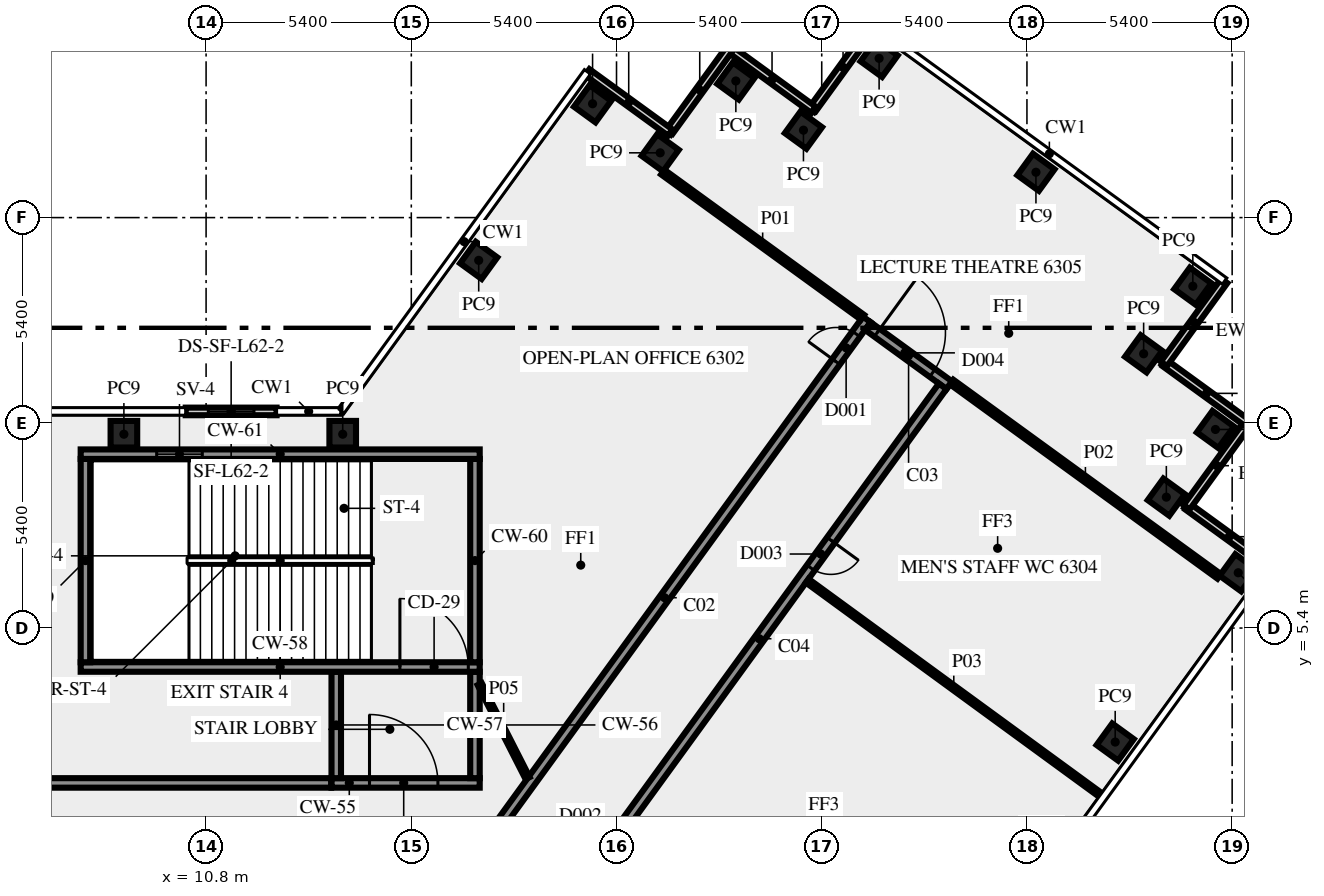
"""IFC4 building model, lengths in metres.
Left out: names, types, materials, properties, quantities, classifications, styles, units other than length and angle.
Written with IfcOpenShell. Run it as: python <this file> out.ifc"""

import sys

from ifc_helpers import new_model, si_unit, direction, frame, frame_2d, origin, origin_2d, place, context, subcontext, project, spatial, rectangle, extrude, element, fill, save


model = new_model("IFC4")
c1 = context("Model", 3, precision=1e-05, world=origin(), true_north=direction((0.0, 1.0)))
c2 = subcontext(c1, "Body", "Model", "MODEL_VIEW")
j1 = project(units=[si_unit("LENGTHUNIT", "METRE"), si_unit("PLANEANGLEUNIT", "RADIAN")], contexts=[c1])
p1 = place(None, origin())
s1 = spatial("IfcSite", under=j1, at=p1, CompositionType="ELEMENT")
p2 = place(p1, origin())
s2 = spatial("IfcBuilding", under=s1, at=p2, CompositionType="ELEMENT")
p3 = place(p2, frame((0.0, 0.0, 269.0)))
s3 = spatial("IfcBuildingStorey", under=s2, at=p3, CompositionType="ELEMENT", Elevation=269.0)
for number, where, z_axis, x_axis in (
    (1, (34.722, 2.4, 0.0), (0.0, 0.0, 1.0), (0.588, 0.809, 0.0)),
    (2, (37.96, 6.855, 0.0), (0.0, 0.0, 1.0), (0.588, 0.809, 0.0)),
    (3, (36.068, 8.844, 0.0), (0.0, 0.0, 1.0), (0.588, 0.809, 0.0)),
    (4, (37.36, 10.625, 0.0), (0.0, 0.0, 1.0), (0.588, 0.809, 0.0)),
    (5, (35.471, 12.616, 0.0), (0.0, 0.0, 1.0), (-0.809, 0.588, 0.0)),
    (6, (36.765, 14.395, 0.0), (0.0, 0.0, 1.0), (-0.809, 0.588, 0.0)),
    (7, (32.637, 17.393, 0.0), (0.0, 0.0, 1.0), (-0.809, 0.588, 0.0)),
    (8, (28.51, 20.39, 0.0), (0.0, 0.0, 1.0), (-0.588, -0.809, 0.0)),
    (9, (26.519, 18.5, 0.0), (0.0, 0.0, 1.0), (-0.809, 0.588, 0.0)),
    (10, (24.74, 19.795, 0.0), (0.0, 0.0, 1.0), (-0.588, -0.809, 0.0)),
    (11, (22.749, 17.904, 0.0), (0.0, 0.0, 1.0), (-0.588, -0.809, 0.0)),
    (12, (20.97, 19.195, 0.0), (0.0, 0.0, 1.0), (-0.588, -0.809, 0.0)),
    (13, (17.974, 15.075, 0.0), (0.0, 0.0, 1.0), (-0.588, -0.809, 0.0)),
    (14, (14.395, 10.5, 0.0), (0.0, 0.0, 1.0), (-1.0, 0.0, 0.0)),
    (15, (8.637, 10.5, 0.0), (0.0, 0.0, 1.0), (-1.0, 0.0, 0.0)),
):
    element("IfcColumn", number, at=place(p3, frame(where, z_axis=z_axis, x_axis=x_axis)), inside=s3, PredefinedType="COLUMN", context=c2, shape_type="SweptSolid", body=[
        extrude(rectangle(XDim=0.7, YDim=0.7, at=origin_2d()), origin(), (0.0, 0.0, 1.0), 3.5),
    ])
for number, where, z_axis, x_axis in (
    (16, (38.814, 7.01, 0.0), (0.0, 0.0, 1.0), (-0.809, 0.588, 0.0)),
    (17, (36.602, 8.58, 0.0), (0.0, 0.0, 1.0), (0.588, 0.809, 0.0)),
    (18, (38.216, 10.782, 0.0), (0.0, 0.0, 1.0), (-0.809, 0.588, 0.0)),
    (19, (36.005, 12.352, 0.0), (0.0, 0.0, 1.0), (0.588, 0.809, 0.0)),
):
    element("IfcWall", number, at=place(p3, frame(where, z_axis=z_axis, x_axis=x_axis)), inside=s3, PredefinedType="SOLIDWALL", context=c2, shape_type="SweptSolid", body=[
        extrude(rectangle(XDim=2.7, YDim=0.2, at=frame_2d((1.35, 0.0))), origin(), (0.0, 0.0, 1.0), 3.5),
    ])
for number, where, z_axis, x_axis in (
    (20, (28.354, 21.247, 0.0), (0.0, 0.0, 1.0), (-0.588, -0.809, 0.0)),
    (21, (26.785, 19.036, 0.0), (0.0, 0.0, 1.0), (-0.809, 0.588, 0.0)),
):
    element("IfcWall", number, at=place(p3, frame(where, z_axis=z_axis, x_axis=x_axis)), inside=s3, PredefinedType="SOLIDWALL", context=c2, shape_type="SweptSolid", body=[
        extrude(rectangle(XDim=2.7, YDim=0.2, at=frame_2d((1.35, 0.0))), origin(), (0.0, 0.0, 1.0), 3.5),
    ])
for number, where, z_axis, x_axis in (
    (22, (24.583, 20.65, 0.0), (0.0, 0.0, 1.0), (-0.588, -0.809, 0.0)),
    (23, (23.013, 18.438, 0.0), (0.0, 0.0, 1.0), (-0.809, 0.588, 0.0)),
):
    element("IfcWall", number, at=place(p3, frame(where, z_axis=z_axis, x_axis=x_axis)), inside=s3, PredefinedType="SOLIDWALL", context=c2, shape_type="SweptSolid", body=[
        extrude(rectangle(XDim=2.7, YDim=0.2, at=frame_2d((1.35, 0.0))), origin(), (0.0, 0.0, 1.0), 3.5),
    ])
p4 = place(p3, frame((12.655, 11.1, 0.0), z_axis=(0.0, 0.0, 1.0), x_axis=(-1.0, 0.0, 0.0)))
e24 = element("IfcWall", 24, at=p4, inside=s3, PredefinedType="SOLIDWALL", context=c2, shape_type="SweptSolid", body=[
    extrude(rectangle(XDim=2.392, YDim=0.2, at=frame_2d((1.196, 0.0))), origin(), (0.0, 0.0, 1.0), 3.5),
])
p5 = place(p4, frame((0.596, 0.0, 1.0)))
e25 = element("IfcOpeningElement", 25, at=p5, cuts=e24, PredefinedType="OPENING", context=c2, shape_type="SweptSolid", body=[
    extrude(rectangle(XDim=1.2, YDim=1.2, at=frame_2d((0.6, 0.6))), frame((0.0, 0.11, 0.0), z_axis=(0.0, -1.0, 0.0), x_axis=(1.0, 0.0, 0.0)), (0.0, 0.0, 1.0), 0.22),
])
p6 = place(p3, frame((14.1, 1.325, 0.0), z_axis=(0.0, 0.0, 1.0), x_axis=(1.0, 0.0, 0.0)))
e26 = element("IfcWall", 26, at=p6, inside=s3, PredefinedType="SHEAR", context=c2, shape_type="SweptSolid", body=[
    extrude(rectangle(XDim=3.9, YDim=0.25, at=frame_2d((1.95, 0.0))), origin(), (0.0, 0.0, 1.0), 3.5),
])
p7 = place(p6, frame((1.0, 0.0, 0.0)))
e27 = element("IfcOpeningElement", 27, at=p7, cuts=e26, PredefinedType="OPENING", context=c2, shape_type="SweptSolid", body=[
    extrude(rectangle(XDim=1.8, YDim=2.1, at=frame_2d((0.9, 1.05))), frame((0.0, 0.135, 0.0), z_axis=(0.0, -1.0, 0.0), x_axis=(1.0, 0.0, 0.0)), (0.0, 0.0, 1.0), 0.27),
])
for number, where, z_axis, x_axis in (
    (28, (14.225, 1.45, 0.0), (0.0, 0.0, 1.0), (0.0, 1.0, 0.0)),
    (29, (17.875, 1.45, 0.0), (0.0, 0.0, 1.0), (0.0, 1.0, 0.0)),
):
    element("IfcWall", number, at=place(p3, frame(where, z_axis=z_axis, x_axis=x_axis)), inside=s3, PredefinedType="SHEAR", context=c2, shape_type="SweptSolid", body=[
        extrude(rectangle(XDim=2.8, YDim=0.25, at=frame_2d((1.4, 0.0))), origin(), (0.0, 0.0, 1.0), 3.5),
    ])
p8 = place(p3, frame((7.5, 4.375, 0.0), z_axis=(0.0, 0.0, 1.0), x_axis=(1.0, 0.0, 0.0)))
e30 = element("IfcWall", 30, at=p8, inside=s3, PredefinedType="SHEAR", context=c2, shape_type="SweptSolid", body=[
    extrude(rectangle(XDim=10.5, YDim=0.25, at=frame_2d((5.25, 0.0))), origin(), (0.0, 0.0, 1.0), 3.5),
])
p9 = place(p8, frame((8.4, 0.0, 0.0)))
e31 = element("IfcOpeningElement", 31, at=p9, cuts=e30, PredefinedType="OPENING", context=c2, shape_type="SweptSolid", body=[
    extrude(rectangle(XDim=1.8, YDim=2.1, at=frame_2d((0.9, 1.05))), frame((0.0, 0.135, 0.0), z_axis=(0.0, -1.0, 0.0), x_axis=(1.0, 0.0, 0.0)), (0.0, 0.0, 1.0), 0.27),
])
for number, where, z_axis, x_axis in (
    (32, (7.625, 4.5, 0.0), (0.0, 0.0, 1.0), (0.0, 1.0, 0.0)),
    (33, (17.875, 4.5, 0.0), (0.0, 0.0, 1.0), (0.0, 1.0, 0.0)),
):
    element("IfcWall", number, at=place(p3, frame(where, z_axis=z_axis, x_axis=x_axis)), inside=s3, PredefinedType="SHEAR", context=c2, shape_type="SweptSolid", body=[
        extrude(rectangle(XDim=5.35, YDim=0.25, at=frame_2d((2.675, 0.0))), origin(), (0.0, 0.0, 1.0), 3.5),
    ])
p10 = place(p3, frame((7.5, 9.975, 0.0), z_axis=(0.0, 0.0, 1.0), x_axis=(1.0, 0.0, 0.0)))
e34 = element("IfcWall", 34, at=p10, inside=s3, PredefinedType="SHEAR", context=c2, shape_type="SweptSolid", body=[
    extrude(rectangle(XDim=10.5, YDim=0.25, at=frame_2d((5.25, 0.0))), origin(), (0.0, 0.0, 1.0), 3.5),
])
p11 = place(p10, frame((2.0, 0.0, 1.0)))
e35 = element("IfcOpeningElement", 35, at=p11, cuts=e34, PredefinedType="OPENING", context=c2, shape_type="SweptSolid", body=[
    extrude(rectangle(XDim=1.2, YDim=1.2, at=frame_2d((0.6, 0.6))), frame((0.0, 0.135, 0.0), z_axis=(0.0, -1.0, 0.0), x_axis=(1.0, 0.0, 0.0)), (0.0, 0.0, 1.0), 0.27),
])
p12 = place(p3, frame((-5.341, 1.325, 0.0), z_axis=(0.0, 0.0, 1.0), x_axis=(1.0, 0.0, 0.0)))
e36 = element("IfcWall", 36, at=p12, inside=s3, PredefinedType="SOLIDWALL", context=c2, shape_type="SweptSolid", body=[
    extrude(rectangle(XDim=19.431, YDim=0.25, at=frame_2d((9.716, 0.0))), origin(), (0.0, 0.0, 1.0), 3.5),
])
p13 = place(p12, frame((8.866, 0.0, 0.0)))
e37 = element("IfcOpeningElement", 37, at=p13, cuts=e36, PredefinedType="OPENING", context=c2, shape_type="SweptSolid", body=[
    extrude(rectangle(XDim=1.8, YDim=2.1, at=frame_2d((0.9, 1.05))), frame((0.0, 0.135, 0.0), z_axis=(0.0, -1.0, 0.0), x_axis=(1.0, 0.0, 0.0)), (0.0, 0.0, 1.0), 0.27),
])
p14 = place(p3, frame((17.545, -1.125, 0.0), z_axis=(0.0, 0.0, 1.0), x_axis=(0.58779555165, 0.809009511354, 0.0)))
e38 = element("IfcWall", 38, at=p14, inside=s3, PredefinedType="SOLIDWALL", context=c2, shape_type="SweptSolid", body=[
    extrude(rectangle(XDim=18.103, YDim=0.25, at=frame_2d((9.052, 0.0))), origin(), (0.0, 0.0, 1.0), 3.5),
])
p15 = place(p14, frame((16.728, 0.0, 0.0)))
e39 = element("IfcOpeningElement", 39, at=p15, cuts=e38, PredefinedType="OPENING", context=c2, shape_type="SweptSolid", body=[
    extrude(rectangle(XDim=0.9, YDim=2.1, at=frame_2d((0.45, 1.05))), frame((0.0, 0.135, 0.0), z_axis=(0.0, -1.0, 0.0), x_axis=(1.0, 0.0, 0.0)), (0.0, 0.0, 1.0), 0.27),
])
p16 = place(p3, frame((28.213, 13.346, 0.0), z_axis=(0.0, 0.0, 1.0), x_axis=(0.809006914995, -0.587799125119, 0.0)))
e40 = element("IfcWall", 40, at=p16, inside=s3, PredefinedType="SOLIDWALL", context=c2, shape_type="SweptSolid", body=[
    extrude(rectangle(XDim=2.65, YDim=0.25, at=frame_2d((1.325, 0.0))), origin(), (0.0, 0.0, 1.0), 3.5),
])
p17 = place(p16, frame((0.3, 0.0, 0.0)))
e41 = element("IfcOpeningElement", 41, at=p17, cuts=e40, PredefinedType="OPENING", context=c2, shape_type="SweptSolid", body=[
    extrude(rectangle(XDim=1.8, YDim=2.1, at=frame_2d((0.9, 1.05))), frame((0.0, 0.135, 0.0), z_axis=(0.0, -1.0, 0.0), x_axis=(1.0, 0.0, 0.0)), (0.0, 0.0, 1.0), 0.27),
])
p18 = place(p3, frame((30.183, 11.761, 0.0), z_axis=(0.0, 0.0, 1.0), x_axis=(-0.587781762867, -0.80901952958, 0.0)))
e42 = element("IfcWall", 42, at=p18, inside=s3, PredefinedType="SOLIDWALL", context=c2, shape_type="SweptSolid", body=[
    extrude(rectangle(XDim=16.42, YDim=0.25, at=frame_2d((8.21, 0.0))), origin(), (0.0, 0.0, 1.0), 3.5),
])
p19 = place(p18, frame((5.005, 0.0, 0.0)))
e43 = element("IfcOpeningElement", 43, at=p19, cuts=e42, PredefinedType="OPENING", context=c2, shape_type="SweptSolid", body=[
    extrude(rectangle(XDim=0.9, YDim=2.1, at=frame_2d((0.45, 1.05))), frame((0.0, 0.135, 0.0), z_axis=(0.0, -1.0, 0.0), x_axis=(1.0, 0.0, 0.0)), (0.0, 0.0, 1.0), 0.27),
])
p20 = place(p18, frame((14.988, 0.0, 0.0)))
e44 = element("IfcOpeningElement", 44, at=p20, cuts=e42, PredefinedType="OPENING", context=c2, shape_type="SweptSolid", body=[
    extrude(rectangle(XDim=0.9, YDim=2.1, at=frame_2d((0.45, 1.05))), frame((0.0, 0.135, 0.0), z_axis=(0.0, -1.0, 0.0), x_axis=(1.0, 0.0, 0.0)), (0.0, 0.0, 1.0), 0.27),
])
p21 = place(p3, frame((28.073, 13.578, 0.0), z_axis=(0.0, 0.0, 1.0), x_axis=(-0.809000932727, 0.587807358619, 0.0)))
e45 = element("IfcWall", 45, at=p21, inside=s3, PredefinedType="PARTITIONING", context=c2, shape_type="SweptSolid", body=[
    extrude(rectangle(XDim=6.496, YDim=0.15, at=frame_2d((3.248, 0.0))), origin(), (0.0, 0.0, 1.0), 3.5),
])
p22 = place(p3, frame((37.458, 6.76, 0.0), z_axis=(0.0, 0.0, 1.0), x_axis=(-0.809016295501, 0.587786214209, 0.0)))
e46 = element("IfcWall", 46, at=p22, inside=s3, PredefinedType="PARTITIONING", context=c2, shape_type="SweptSolid", body=[
    extrude(rectangle(XDim=8.7, YDim=0.15, at=frame_2d((4.35, 0.0))), origin(), (0.0, 0.0, 1.0), 3.5),
])
p23 = place(p3, frame((26.619, 6.643, 0.0), z_axis=(0.0, 0.0, 1.0), x_axis=(0.807594822539, -0.589737740532, 0.0)))
e47 = element("IfcWall", 47, at=p23, inside=s3, PredefinedType="PARTITIONING", context=c2, shape_type="SweptSolid", body=[
    extrude(rectangle(XDim=9.55, YDim=0.12, at=frame_2d((4.775, 0.0))), origin(), (0.0, 0.0, 1.0), 2.8),
])
p24 = place(p3, frame((18.0, 3.925, 0.0), z_axis=(0.0, 0.0, 1.0), x_axis=(0.453950796792, -0.891026752736, 0.0)))
e48 = element("IfcWall", 48, at=p24, inside=s3, PredefinedType="PARTITIONING", context=c2, shape_type="SweptSolid", body=[
    extrude(rectangle(XDim=2.778, YDim=0.12, at=frame_2d((1.389, 0.0))), origin(), (0.0, 0.0, 1.0), 3.5),
])
p25 = place(p5, origin())
e49 = element("IfcWindow", 49, at=p25, inside=s3, PartitioningType="SINGLE_PANEL", PredefinedType="WINDOW", context=c2, shape_type="SweptSolid", body=[
    extrude(rectangle(XDim=1.2, YDim=1.2, at=frame_2d((0.6, 0.6))), frame((0.0, 0.03, 0.0), z_axis=(0.0, -1.0, 0.0), x_axis=(1.0, 0.0, 0.0)), (0.0, 0.0, 1.0), 0.06),
])
fill(e25, e49)
p26 = place(p7, origin())
e50 = element("IfcDoor", 50, at=p26, inside=s3, OperationType="DOUBLE_DOOR_SINGLE_SWING", PredefinedType="DOOR", context=c2, shape_type="SweptSolid", body=[
    extrude(rectangle(XDim=1.8, YDim=2.1, at=frame_2d((0.9, 1.05))), frame((0.0, 0.025, 0.0), z_axis=(0.0, -1.0, 0.0), x_axis=(1.0, 0.0, 0.0)), (0.0, 0.0, 1.0), 0.05),
])
fill(e27, e50)
p27 = place(p9, origin())
e51 = element("IfcDoor", 51, at=p27, inside=s3, OperationType="DOUBLE_DOOR_SINGLE_SWING", PredefinedType="DOOR", context=c2, shape_type="SweptSolid", body=[
    extrude(rectangle(XDim=1.8, YDim=2.1, at=frame_2d((0.9, 1.05))), frame((0.0, 0.025, 0.0), z_axis=(0.0, -1.0, 0.0), x_axis=(1.0, 0.0, 0.0)), (0.0, 0.0, 1.0), 0.05),
])
fill(e31, e51)
p28 = place(p11, origin())
e52 = element("IfcWindow", 52, at=p28, inside=s3, PartitioningType="SINGLE_PANEL", PredefinedType="WINDOW", context=c2, shape_type="SweptSolid", body=[
    extrude(rectangle(XDim=1.2, YDim=1.2, at=frame_2d((0.6, 0.6))), frame((0.0, 0.03, 0.0), z_axis=(0.0, -1.0, 0.0), x_axis=(1.0, 0.0, 0.0)), (0.0, 0.0, 1.0), 0.06),
])
fill(e35, e52)
p29 = place(p15, origin())
e53 = element("IfcDoor", 53, at=p29, inside=s3, OperationType="SINGLE_SWING_RIGHT", PredefinedType="DOOR", context=c2, shape_type="SweptSolid", body=[
    extrude(rectangle(XDim=0.9, YDim=2.1, at=frame_2d((0.45, 1.05))), frame((0.0, 0.025, 0.0), z_axis=(0.0, -1.0, 0.0), x_axis=(1.0, 0.0, 0.0)), (0.0, 0.0, 1.0), 0.05),
])
fill(e39, e53)
p30 = place(p19, origin())
e54 = element("IfcDoor", 54, at=p30, inside=s3, OperationType="SINGLE_SWING_RIGHT", PredefinedType="DOOR", context=c2, shape_type="SweptSolid", body=[
    extrude(rectangle(XDim=0.9, YDim=2.1, at=frame_2d((0.45, 1.05))), frame((0.0, 0.025, 0.0), z_axis=(0.0, -1.0, 0.0), x_axis=(1.0, 0.0, 0.0)), (0.0, 0.0, 1.0), 0.05),
])
fill(e43, e54)
p31 = place(p17, origin())
e55 = element("IfcDoor", 55, at=p31, inside=s3, OperationType="DOUBLE_DOOR_SINGLE_SWING", PredefinedType="DOOR", context=c2, shape_type="SweptSolid", body=[
    extrude(rectangle(XDim=1.8, YDim=2.1, at=frame_2d((0.9, 1.05))), frame((0.0, 0.025, 0.0), z_axis=(0.0, -1.0, 0.0), x_axis=(1.0, 0.0, 0.0)), (0.0, 0.0, 1.0), 0.05),
])
fill(e41, e55)
save(model, sys.argv[1])
